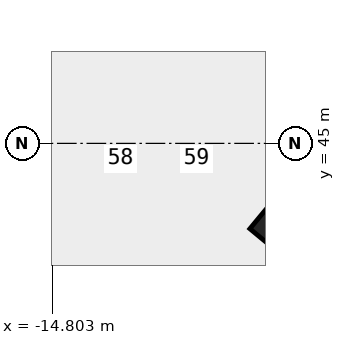
"""IFC4 building model, lengths in metres.
Left out: names, types, materials, properties, quantities, classifications, styles, units other than length and angle.
Written with IfcOpenShell. Run it as: python <this file> out.ifc"""

import sys

from ifc_helpers import new_model, si_unit, direction, frame, origin, origin_2d, place, context, subcontext, project, spatial, rectangle, extrude, element, save


model = new_model("IFC4")
c1 = context("Model", 3, precision=1e-05, world=origin(), true_north=direction((0.0, 1.0)))
c2 = subcontext(c1, "Body", "Model", "MODEL_VIEW")
j1 = project(units=[si_unit("LENGTHUNIT", "METRE"), si_unit("PLANEANGLEUNIT", "RADIAN")], contexts=[c1])
p1 = place(None, origin())
s1 = spatial("IfcSite", under=j1, at=p1, CompositionType="ELEMENT")
p2 = place(p1, origin())
s2 = spatial("IfcBuilding", under=s1, at=p2, CompositionType="ELEMENT")
p3 = place(p2, frame((0.0, 0.0, -16.5)))
s3 = spatial("IfcBuildingStorey", under=s2, at=p3, CompositionType="ELEMENT", Elevation=-16.5)
p4 = place(p3, frame((-7.299, 42.144, -0.4), z_axis=(0.0, 0.0, 1.0), x_axis=(0.637666022163, 0.770312952103, 0.0)))
e1 = element("IfcColumn", 1, at=p4, inside=s3, PredefinedType="COLUMN", context=c2, shape_type="SweptSolid", body=[
    extrude(rectangle(XDim=1.2, YDim=1.6, at=origin_2d()), origin(), (0.0, 0.0, 1.0), 5.48),
])
save(model, sys.argv[1])
